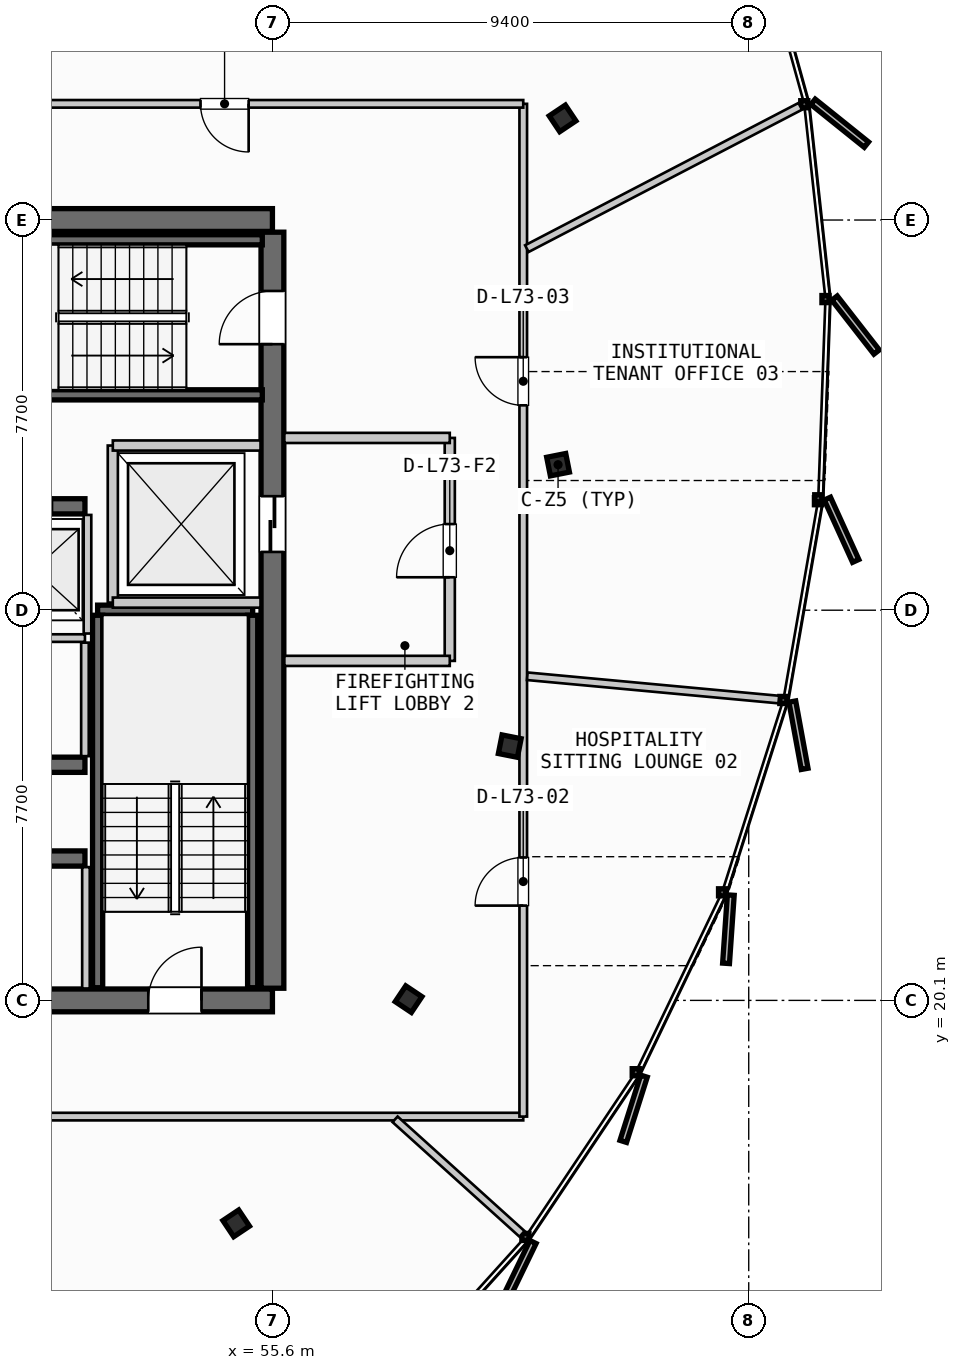
"""IFC4 building model, lengths in metres.
Left out: names, types, materials, properties, quantities, classifications, styles, units other than length and angle.
Written with IfcOpenShell. Run it as: python <this file> out.ifc"""

import sys

from ifc_helpers import new_model, si_unit, direction, frame, frame_2d, origin, origin_2d, place, context, subcontext, project, spatial, rectangle, i_section, extrude, source, transform, mapped, element, fill, save


model = new_model("IFC4")
c1 = context("Model", 3, precision=1e-05, world=origin(), true_north=direction((0.0, 1.0)))
c2 = subcontext(c1, "Body", "Model", "MODEL_VIEW")
j1 = project(units=[si_unit("LENGTHUNIT", "METRE"), si_unit("PLANEANGLEUNIT", "RADIAN")], contexts=[c1])
p1 = place(None, origin())
s1 = spatial("IfcSite", under=j1, at=p1, CompositionType="ELEMENT")
p2 = place(p1, origin())
s2 = spatial("IfcBuilding", under=s1, at=p2, CompositionType="ELEMENT")
p3 = place(p2, frame((0.0, 0.0, 276.7)))
s3 = spatial("IfcBuildingStorey", under=s2, at=p3, CompositionType="ELEMENT", Elevation=276.7)
p4 = place(p3, frame((38.0, 20.1, 0.0), z_axis=(0.0, 0.0, 1.0), x_axis=(1.0, 0.0, 0.0)))
e1 = element("IfcWall", 1, at=p4, inside=s3, PredefinedType="SHEAR", context=c2, shape_type="SweptSolid", body=[
    extrude(rectangle(XDim=17.6, YDim=0.45, at=frame_2d((8.8, 0.0))), origin(), (0.0, 0.0, 1.0), 3.21),
])
p5 = place(p4, frame((1.4, 0.0, 0.0)))
e2 = element("IfcOpeningElement", 2, at=p5, cuts=e1, PredefinedType="OPENING", context=c2, shape_type="SweptSolid", body=[
    extrude(rectangle(XDim=1.05, YDim=2.15, at=frame_2d((0.525, 1.075))), frame((0.0, 0.235, 0.0), z_axis=(0.0, -1.0, 0.0), x_axis=(1.0, 0.0, 0.0)), (0.0, 0.0, 1.0), 0.47),
])
p6 = place(p4, frame((15.15, 0.0, 0.0)))
e3 = element("IfcOpeningElement", 3, at=p6, cuts=e1, PredefinedType="OPENING", context=c2, shape_type="SweptSolid", body=[
    extrude(rectangle(XDim=1.05, YDim=2.15, at=frame_2d((0.525, 1.075))), frame((0.0, 0.235, 0.0), z_axis=(0.0, -1.0, 0.0), x_axis=(1.0, 0.0, 0.0)), (0.0, 0.0, 1.0), 0.47),
])
p7 = place(p4, frame((5.25, 0.0, 0.0)))
e4 = element("IfcOpeningElement", 4, at=p7, cuts=e1, PredefinedType="OPENING", context=c2, shape_type="SweptSolid", body=[
    extrude(rectangle(XDim=0.95, YDim=2.15, at=frame_2d((0.475, 1.075))), frame((0.0, 0.235, 0.0), z_axis=(0.0, -1.0, 0.0), x_axis=(1.0, 0.0, 0.0)), (0.0, 0.0, 1.0), 0.47),
])
p8 = place(p4, frame((11.4, 0.0, 0.0)))
e5 = element("IfcOpeningElement", 5, at=p8, cuts=e1, PredefinedType="OPENING", context=c2, shape_type="SweptSolid", body=[
    extrude(rectangle(XDim=0.95, YDim=2.15, at=frame_2d((0.475, 1.075))), frame((0.0, 0.235, 0.0), z_axis=(0.0, -1.0, 0.0), x_axis=(1.0, 0.0, 0.0)), (0.0, 0.0, 1.0), 0.47),
])
p9 = place(p3, frame((55.6, 35.5, 0.0), z_axis=(0.0, 0.0, 1.0), x_axis=(-1.0, 0.0, 0.0)))
e6 = element("IfcWall", 6, at=p9, inside=s3, PredefinedType="SHEAR", context=c2, shape_type="SweptSolid", body=[
    extrude(rectangle(XDim=17.6, YDim=0.45, at=frame_2d((8.8, 0.0))), origin(), (0.0, 0.0, 1.0), 3.21),
])
p10 = place(p9, frame((8.05, 0.0, 0.0)))
e7 = element("IfcOpeningElement", 7, at=p10, cuts=e6, PredefinedType="OPENING", context=c2, shape_type="SweptSolid", body=[
    extrude(rectangle(XDim=1.5, YDim=2.2, at=frame_2d((0.75, 1.1))), frame((0.0, 0.235, 0.0), z_axis=(0.0, -1.0, 0.0), x_axis=(1.0, 0.0, 0.0)), (0.0, 0.0, 1.0), 0.47),
])
p11 = place(p9, frame((15.85, 0.0, 0.0)))
e8 = element("IfcOpeningElement", 8, at=p11, cuts=e6, PredefinedType="OPENING", context=c2, shape_type="SweptSolid", body=[
    extrude(rectangle(XDim=0.85, YDim=2.15, at=frame_2d((0.425, 1.075))), frame((0.0, 0.235, 0.0), z_axis=(0.0, -1.0, 0.0), x_axis=(1.0, 0.0, 0.0)), (0.0, 0.0, 1.0), 0.47),
])
p12 = place(p9, frame((14.35, 0.0, 0.0)))
e9 = element("IfcOpeningElement", 9, at=p12, cuts=e6, PredefinedType="OPENING", context=c2, shape_type="SweptSolid", body=[
    extrude(rectangle(XDim=0.85, YDim=2.15, at=frame_2d((0.425, 1.075))), frame((0.0, 0.235, 0.0), z_axis=(0.0, -1.0, 0.0), x_axis=(1.0, 0.0, 0.0)), (0.0, 0.0, 1.0), 0.47),
])
p13 = place(p9, frame((12.3, 0.0, 0.0)))
e10 = element("IfcOpeningElement", 10, at=p13, cuts=e6, PredefinedType="OPENING", context=c2, shape_type="SweptSolid", body=[
    extrude(rectangle(XDim=0.95, YDim=2.15, at=frame_2d((0.475, 1.075))), frame((0.0, 0.235, 0.0), z_axis=(0.0, -1.0, 0.0), x_axis=(1.0, 0.0, 0.0)), (0.0, 0.0, 1.0), 0.47),
])
p14 = place(p9, frame((10.2, 0.0, 0.0)))
e11 = element("IfcOpeningElement", 11, at=p14, cuts=e6, PredefinedType="OPENING", context=c2, shape_type="SweptSolid", body=[
    extrude(rectangle(XDim=0.9, YDim=2.15, at=frame_2d((0.45, 1.075))), frame((0.0, 0.235, 0.0), z_axis=(0.0, -1.0, 0.0), x_axis=(1.0, 0.0, 0.0)), (0.0, 0.0, 1.0), 0.47),
])
p15 = place(p3, frame((55.6, 20.34, 0.0), z_axis=(0.0, 0.0, 1.0), x_axis=(0.0, 1.0, 0.0)))
e12 = element("IfcWall", 12, at=p15, inside=s3, PredefinedType="SHEAR", context=c2, shape_type="SweptSolid", body=[
    extrude(rectangle(XDim=14.92, YDim=0.45, at=frame_2d((7.46, 0.0))), origin(), (0.0, 0.0, 1.0), 3.21),
])
p16 = place(p15, frame((12.71, 0.0, 0.0)))
e13 = element("IfcOpeningElement", 13, at=p16, cuts=e12, PredefinedType="OPENING", context=c2, shape_type="SweptSolid", body=[
    extrude(rectangle(XDim=1.05, YDim=2.15, at=frame_2d((0.525, 1.075))), frame((0.0, 0.235, 0.0), z_axis=(0.0, -1.0, 0.0), x_axis=(1.0, 0.0, 0.0)), (0.0, 0.0, 1.0), 0.47),
])
p17 = place(p15, frame((8.61, 0.0, 0.0)))
e14 = element("IfcOpeningElement", 14, at=p17, cuts=e12, PredefinedType="OPENING", context=c2, shape_type="SweptSolid", body=[
    extrude(rectangle(XDim=1.1, YDim=2.2, at=frame_2d((0.55, 1.1))), frame((0.0, 0.235, 0.0), z_axis=(0.0, -1.0, 0.0), x_axis=(1.0, 0.0, 0.0)), (0.0, 0.0, 1.0), 0.47),
])
p18 = place(p3, frame((47.65, 22.9, 0.0), z_axis=(0.0, 0.0, 1.0), x_axis=(1.0, 0.0, 0.0)))
e15 = element("IfcWall", 15, at=p18, inside=s3, PredefinedType="SHEAR", context=c2, shape_type="SweptSolid", body=[
    extrude(rectangle(XDim=4.25, YDim=0.3, at=frame_2d((2.125, 0.0))), origin(), (0.0, 0.0, 1.0), 3.21),
])
p19 = place(p3, frame((47.65, 24.75, 0.0), z_axis=(0.0, 0.0, 1.0), x_axis=(1.0, 0.0, 0.0)))
e16 = element("IfcWall", 16, at=p19, inside=s3, PredefinedType="SHEAR", context=c2, shape_type="SweptSolid", body=[
    extrude(rectangle(XDim=4.25, YDim=0.3, at=frame_2d((2.125, 0.0))), origin(), (0.0, 0.0, 1.0), 3.21),
])
p20 = place(p19, frame((1.55, 0.0, 0.0)))
e17 = element("IfcOpeningElement", 17, at=p20, cuts=e16, PredefinedType="OPENING", context=c2, shape_type="SweptSolid", body=[
    extrude(rectangle(XDim=0.95, YDim=2.15, at=frame_2d((0.475, 1.075))), frame((0.0, 0.16, 0.0), z_axis=(0.0, -1.0, 0.0), x_axis=(1.0, 0.0, 0.0)), (0.0, 0.0, 1.0), 0.32),
])
p21 = place(p3, frame((47.65, 29.85, 0.0), z_axis=(0.0, 0.0, 1.0), x_axis=(1.0, 0.0, 0.0)))
e18 = element("IfcWall", 18, at=p21, inside=s3, PredefinedType="SHEAR", context=c2, shape_type="SweptSolid", body=[
    extrude(rectangle(XDim=4.25, YDim=0.3, at=frame_2d((2.125, 0.0))), origin(), (0.0, 0.0, 1.0), 3.21),
])
p22 = place(p21, frame((0.45, 0.0, 0.0)))
e19 = element("IfcOpeningElement", 19, at=p22, cuts=e18, PredefinedType="OPENING", context=c2, shape_type="SweptSolid", body=[
    extrude(rectangle(XDim=1.1, YDim=2.2, at=frame_2d((0.55, 1.1))), frame((0.0, 0.16, 0.0), z_axis=(0.0, -1.0, 0.0), x_axis=(1.0, 0.0, 0.0)), (0.0, 0.0, 1.0), 0.32),
])
p23 = place(p21, frame((2.5, 0.0, 0.0)))
e20 = element("IfcOpeningElement", 20, at=p23, cuts=e18, PredefinedType="OPENING", context=c2, shape_type="SweptSolid", body=[
    extrude(rectangle(XDim=1.1, YDim=2.2, at=frame_2d((0.55, 1.1))), frame((0.0, 0.16, 0.0), z_axis=(0.0, -1.0, 0.0), x_axis=(1.0, 0.0, 0.0)), (0.0, 0.0, 1.0), 0.32),
])
m1 = source(origin(), c2, "Body", "SweptSolid", [
    extrude(i_section(OverallWidth=0.374, OverallDepth=0.383, WebThickness=0.017, FlangeThickness=0.026, FilletRadius=0.015, at=origin_2d()), origin(), (0.0, 0.0, 1.0), 3.21),
])
for number, where, z_axis, x_axis in (
    (21, (61.237, 30.672, 0.0), (0.0, 0.0, 1.0), (0.981, 0.195, 0.0)),
    (22, (61.326, 37.506, 0.0), (0.0, 0.0, 1.0), (0.831, 0.556, 0.0)),
    (23, (54.885, 15.7, 0.0), (0.0, 0.0, 1.0), (0.556, -0.831, 0.0)),
    (24, (58.287, 20.125, 0.0), (0.0, 0.0, 1.0), (0.831, -0.556, 0.0)),
    (25, (60.284, 25.118, 0.0), (0.0, 0.0, 1.0), (0.981, -0.195, 0.0)),
):
    element("IfcColumn", number, at=place(p3, frame(where, z_axis=z_axis, x_axis=x_axis)), inside=s3, PredefinedType="COLUMN", context=c2, shape_type="MappedRepresentation", body=[
        mapped(m1, transform((0.0, 0.0, 0.0), scale=1.0)),
    ])
p24 = place(p3, frame((52.15, 27.8, 0.0), z_axis=(0.0, 0.0, 1.0), x_axis=(1.0, 0.0, 0.0)))
e26 = element("IfcWall", 26, at=p24, inside=s3, PredefinedType="SHEAR", context=c2, shape_type="SweptSolid", body=[
    extrude(rectangle(XDim=3.06, YDim=0.2, at=frame_2d((1.53, 0.0))), origin(), (0.0, 0.0, 1.0), 3.21),
])
for number, where, z_axis, x_axis in (
    (27, (55.21, 27.7, 0.0), (0.0, 0.0, 1.0), (0.0, -1.0, 0.0)),
    (28, (52.15, 20.35, 0.0), (0.0, 0.0, 1.0), (0.0, 1.0, 0.0)),
    (29, (48.05, 35.11, 0.0), (0.0, 0.0, 1.0), (1.0, 0.0, 0.0)),
    (30, (55.4, 32.05, 0.0), (0.0, 0.0, 1.0), (-1.0, 0.0, 0.0)),
):
    element("IfcWall", number, at=place(p3, frame(where, z_axis=z_axis, x_axis=x_axis)), inside=s3, PredefinedType="SHEAR", context=c2, shape_type="SweptSolid", body=[
        extrude(rectangle(XDim=7.35, YDim=0.2, at=frame_2d((3.675, 0.0))), origin(), (0.0, 0.0, 1.0), 3.21),
    ])
p25 = place(p3, frame((52.45, 27.95, 0.0), z_axis=(0.0, 0.0, 1.0), x_axis=(0.0, 1.0, 0.0)))
e31 = element("IfcWall", 31, at=p25, inside=s3, PredefinedType="PARTITIONING", context=c2, shape_type="SweptSolid", body=[
    extrude(rectangle(XDim=3.1, YDim=0.2, at=frame_2d((1.55, 0.0))), origin(), (0.0, 0.0, 1.0), 2.455),
])
for number, where, z_axis, x_axis in (
    (32, (52.45, 27.95, 0.0), (0.0, 0.0, 1.0), (1.0, 0.0, 0.0)),
    (33, (52.45, 31.05, 0.0), (0.0, 0.0, 1.0), (1.0, 0.0, 0.0)),
):
    element("IfcWall", number, at=place(p3, frame(where, z_axis=z_axis, x_axis=x_axis)), inside=s3, PredefinedType="PARTITIONING", context=c2, shape_type="SweptSolid", body=[
        extrude(rectangle(XDim=2.915, YDim=0.2, at=frame_2d((1.458, 0.0))), origin(), (0.0, 0.0, 1.0), 2.455),
    ])
p26 = place(p3, frame((59.1, 26.8, 0.0), z_axis=(0.0, 0.0, 1.0), x_axis=(0.0, 1.0, 0.0)))
e34 = element("IfcWall", 34, at=p26, inside=s3, PredefinedType="PARTITIONING", context=c2, shape_type="SweptSolid", body=[
    extrude(rectangle(XDim=4.4, YDim=0.2, at=frame_2d((2.2, 0.0))), origin(), (0.0, 0.0, 1.0), 2.455),
])
p27 = place(p26, frame((1.65, 0.0, 0.0)))
e35 = element("IfcOpeningElement", 35, at=p27, cuts=e34, PredefinedType="OPENING", context=c2, shape_type="SweptSolid", body=[
    extrude(rectangle(XDim=1.05, YDim=2.15, at=frame_2d((0.525, 1.075))), frame((0.0, 0.11, 0.0), z_axis=(0.0, -1.0, 0.0), x_axis=(1.0, 0.0, 0.0)), (0.0, 0.0, 1.0), 0.22),
])
for number, where, z_axis, x_axis in (
    (36, (55.835, 26.8, 0.0), (0.0, 0.0, 1.0), (1.0, 0.0, 0.0)),
    (37, (55.835, 31.2, 0.0), (0.0, 0.0, 1.0), (1.0, 0.0, 0.0)),
):
    element("IfcWall", number, at=place(p3, frame(where, z_axis=z_axis, x_axis=x_axis)), inside=s3, PredefinedType="PARTITIONING", context=c2, shape_type="SweptSolid", body=[
        extrude(rectangle(XDim=3.265, YDim=0.2, at=frame_2d((1.633, 0.0))), origin(), (0.0, 0.0, 1.0), 2.455),
    ])
p28 = place(p3, frame((51.92, 20.335, 0.0), z_axis=(0.0, 0.0, 1.0), x_axis=(0.0, 1.0, 0.0)))
e38 = element("IfcWall", 38, at=p28, inside=s3, PredefinedType="PARTITIONING", context=c2, shape_type="SweptSolid", body=[
    extrude(rectangle(XDim=2.395, YDim=0.15, at=frame_2d((1.198, 0.0))), origin(), (0.0, 0.0, 1.0), 2.455),
])
p29 = place(p3, frame((47.65, 27.25, 0.0), z_axis=(0.0, 0.0, 1.0), x_axis=(1.0, 0.0, 0.0)))
e39 = element("IfcWall", 39, at=p29, inside=s3, PredefinedType="PARTITIONING", context=c2, shape_type="SweptSolid", body=[
    extrude(rectangle(XDim=4.25, YDim=0.15, at=frame_2d((2.125, 0.0))), origin(), (0.0, 0.0, 1.0), 2.455),
])
p30 = place(p3, frame((51.9, 24.92, 0.0), z_axis=(0.0, 0.0, 1.0), x_axis=(0.0, 1.0, 0.0)))
e40 = element("IfcWall", 40, at=p30, inside=s3, PredefinedType="PARTITIONING", context=c2, shape_type="SweptSolid", body=[
    extrude(rectangle(XDim=2.24, YDim=0.15, at=frame_2d((1.12, 0.0))), origin(), (0.0, 0.0, 1.0), 2.455),
])
p31 = place(p3, frame((51.95, 27.34, 0.0), z_axis=(0.0, 0.0, 1.0), x_axis=(0.0, 1.0, 0.0)))
e41 = element("IfcWall", 41, at=p31, inside=s3, PredefinedType="PARTITIONING", context=c2, shape_type="SweptSolid", body=[
    extrude(rectangle(XDim=2.34, YDim=0.15, at=frame_2d((1.17, 0.0))), origin(), (0.0, 0.0, 1.0), 2.455),
])
p32 = place(p3, frame((31.68, 17.807, 0.0), z_axis=(0.0, 0.0, 1.0), x_axis=(1.0, 0.0, 0.0)))
e42 = element("IfcWall", 42, at=p32, inside=s3, PredefinedType="PARTITIONING", context=c2, shape_type="SweptSolid", body=[
    extrude(rectangle(XDim=28.87, YDim=0.15, at=frame_2d((14.435, 0.0))), origin(), (0.0, 0.0, 1.0), 2.455),
])
p33 = place(p32, frame((13.025, 0.0, 0.0)))
e43 = element("IfcOpeningElement", 43, at=p33, cuts=e42, PredefinedType="OPENING", context=c2, shape_type="SweptSolid", body=[
    extrude(rectangle(XDim=0.95, YDim=2.15, at=frame_2d((0.475, 1.075))), frame((0.0, 0.085, 0.0), z_axis=(0.0, -1.0, 0.0), x_axis=(1.0, 0.0, 0.0)), (0.0, 0.0, 1.0), 0.17),
])
p34 = place(p3, frame((60.55, 17.807, 0.0), z_axis=(0.0, 0.0, 1.0), x_axis=(0.0, 1.0, 0.0)))
e44 = element("IfcWall", 44, at=p34, inside=s3, PredefinedType="PARTITIONING", context=c2, shape_type="SweptSolid", body=[
    extrude(rectangle(XDim=19.986, YDim=0.15, at=frame_2d((9.993, 0.0))), origin(), (0.0, 0.0, 1.0), 2.455),
])
p35 = place(p34, frame((4.164, 0.0, 0.0)))
e45 = element("IfcOpeningElement", 45, at=p35, cuts=e44, PredefinedType="OPENING", context=c2, shape_type="SweptSolid", body=[
    extrude(rectangle(XDim=0.95, YDim=2.15, at=frame_2d((0.475, 1.075))), frame((0.0, 0.085, 0.0), z_axis=(0.0, -1.0, 0.0), x_axis=(1.0, 0.0, 0.0)), (0.0, 0.0, 1.0), 0.17),
])
p36 = place(p34, frame((14.036, 0.0, 0.0)))
e46 = element("IfcOpeningElement", 46, at=p36, cuts=e44, PredefinedType="OPENING", context=c2, shape_type="SweptSolid", body=[
    extrude(rectangle(XDim=0.95, YDim=2.15, at=frame_2d((0.475, 1.075))), frame((0.0, 0.085, 0.0), z_axis=(0.0, -1.0, 0.0), x_axis=(1.0, 0.0, 0.0)), (0.0, 0.0, 1.0), 0.17),
])
p37 = place(p3, frame((60.55, 37.793, 0.0), z_axis=(0.0, 0.0, 1.0), x_axis=(-1.0, 0.0, 0.0)))
e47 = element("IfcWall", 47, at=p37, inside=s3, PredefinedType="PARTITIONING", context=c2, shape_type="SweptSolid", body=[
    extrude(rectangle(XDim=28.87, YDim=0.15, at=frame_2d((14.435, 0.0))), origin(), (0.0, 0.0, 1.0), 2.455),
])
p38 = place(p37, frame((5.419, 0.0, 0.0)))
e48 = element("IfcOpeningElement", 48, at=p38, cuts=e47, PredefinedType="OPENING", context=c2, shape_type="SweptSolid", body=[
    extrude(rectangle(XDim=0.95, YDim=2.15, at=frame_2d((0.475, 1.075))), frame((0.0, 0.085, 0.0), z_axis=(0.0, -1.0, 0.0), x_axis=(1.0, 0.0, 0.0)), (0.0, 0.0, 1.0), 0.17),
])
p39 = place(p37, frame((19.27, 0.0, 0.0)))
e49 = element("IfcOpeningElement", 49, at=p39, cuts=e47, PredefinedType="OPENING", context=c2, shape_type="SweptSolid", body=[
    extrude(rectangle(XDim=0.95, YDim=2.15, at=frame_2d((0.475, 1.075))), frame((0.0, 0.085, 0.0), z_axis=(0.0, -1.0, 0.0), x_axis=(1.0, 0.0, 0.0)), (0.0, 0.0, 1.0), 0.17),
])
p40 = place(p3, frame((58.021, 17.753, 0.0), z_axis=(0.0, 0.0, 1.0), x_axis=(0.742383464778, -0.669975216873, 0.0)))
e50 = element("IfcWall", 50, at=p40, inside=s3, PredefinedType="PARTITIONING", context=c2, shape_type="SweptSolid", body=[
    extrude(rectangle(XDim=3.375, YDim=0.15, at=frame_2d((1.688, 0.0))), origin(), (0.0, 0.0, 1.0), 2.455),
])
p41 = place(p3, frame((60.63, 26.497, 0.0), z_axis=(0.0, 0.0, 1.0), x_axis=(0.995729843394, -0.092315106964, 0.0)))
e51 = element("IfcWall", 51, at=p41, inside=s3, PredefinedType="PARTITIONING", context=c2, shape_type="SweptSolid", body=[
    extrude(rectangle(XDim=4.985, YDim=0.15, at=frame_2d((2.493, 0.0))), origin(), (0.0, 0.0, 1.0), 2.455),
])
p42 = place(p3, frame((60.621, 34.936, 0.0), z_axis=(0.0, 0.0, 1.0), x_axis=(0.887068888944, 0.461637072025, 0.0)))
e52 = element("IfcWall", 52, at=p42, inside=s3, PredefinedType="PARTITIONING", context=c2, shape_type="SweptSolid", body=[
    extrude(rectangle(XDim=6.083, YDim=0.15, at=frame_2d((3.041, 0.0))), origin(), (0.0, 0.0, 1.0), 2.455),
])
p43 = place(p3, frame((49.361, 37.871, 0.0), z_axis=(0.0, 0.0, 1.0), x_axis=(0.248764179593, 0.968564083038, 0.0)))
e53 = element("IfcWall", 53, at=p43, inside=s3, PredefinedType="PARTITIONING", context=c2, shape_type="SweptSolid", body=[
    extrude(rectangle(XDim=13.187, YDim=0.15, at=frame_2d((6.594, 0.0))), origin(), (0.0, 0.0, 1.0), 2.455),
])
m2 = source(origin(), c2, "Body", "SweptSolid", [
    extrude(rectangle(XDim=1.05, YDim=2.15, at=frame_2d((0.525, 1.075))), frame((0.0, 0.025, 0.0), z_axis=(0.0, -1.0, 0.0), x_axis=(1.0, 0.0, 0.0)), (0.0, 0.0, 1.0), 0.05),
])
p44 = place(p6, origin())
e54 = element("IfcDoor", 54, at=p44, inside=s3, OperationType="SINGLE_SWING_RIGHT", PredefinedType="DOOR", context=c2, shape_type="MappedRepresentation", body=[
    mapped(m2, transform((0.0, 0.0, 0.0), scale=1.0)),
])
fill(e3, e54)
p45 = place(p16, origin())
e55 = element("IfcDoor", 55, at=p45, inside=s3, OperationType="SINGLE_SWING_LEFT", PredefinedType="DOOR", context=c2, shape_type="MappedRepresentation", body=[
    mapped(m2, transform((0.0, 0.0, 0.0), scale=1.0)),
])
fill(e13, e55)
m3 = source(origin(), c2, "Body", "SweptSolid", [
    extrude(rectangle(XDim=1.1, YDim=2.2, at=frame_2d((0.55, 1.1))), frame((0.0, 0.025, 0.0), z_axis=(0.0, -1.0, 0.0), x_axis=(1.0, 0.0, 0.0)), (0.0, 0.0, 1.0), 0.05),
])
p46 = place(p17, origin())
e56 = element("IfcDoor", 56, at=p46, inside=s3, OperationType="SLIDING_TO_RIGHT", PredefinedType="DOOR", context=c2, shape_type="MappedRepresentation", body=[
    mapped(m3, transform((0.0, 0.0, 0.0), scale=1.0)),
])
fill(e14, e56)
p47 = place(p27, origin())
e57 = element("IfcDoor", 57, at=p47, inside=s3, OperationType="SINGLE_SWING_LEFT", PredefinedType="DOOR", context=c2, shape_type="MappedRepresentation", body=[
    mapped(m2, transform((0.0, 0.0, 0.0), scale=1.0)),
])
fill(e35, e57)
m4 = source(origin(), c2, "Body", "SweptSolid", [
    extrude(rectangle(XDim=0.95, YDim=2.15, at=frame_2d((0.475, 1.075))), frame((0.0, 0.025, 0.0), z_axis=(0.0, -1.0, 0.0), x_axis=(1.0, 0.0, 0.0)), (0.0, 0.0, 1.0), 0.05),
])
p48 = place(p35, origin())
e58 = element("IfcDoor", 58, at=p48, inside=s3, OperationType="SINGLE_SWING_LEFT", PredefinedType="DOOR", context=c2, shape_type="MappedRepresentation", body=[
    mapped(m4, transform((0.0, 0.0, 0.0), scale=1.0)),
])
fill(e45, e58)
p49 = place(p36, origin())
e59 = element("IfcDoor", 59, at=p49, inside=s3, OperationType="SINGLE_SWING_RIGHT", PredefinedType="DOOR", context=c2, shape_type="MappedRepresentation", body=[
    mapped(m4, transform((0.0, 0.0, 0.0), scale=1.0)),
])
fill(e46, e59)
p50 = place(p38, origin())
e60 = element("IfcDoor", 60, at=p50, inside=s3, OperationType="SINGLE_SWING_LEFT", PredefinedType="DOOR", context=c2, shape_type="MappedRepresentation", body=[
    mapped(m4, transform((0.0, 0.0, 0.0), scale=1.0)),
])
fill(e48, e60)
save(model, sys.argv[1])
